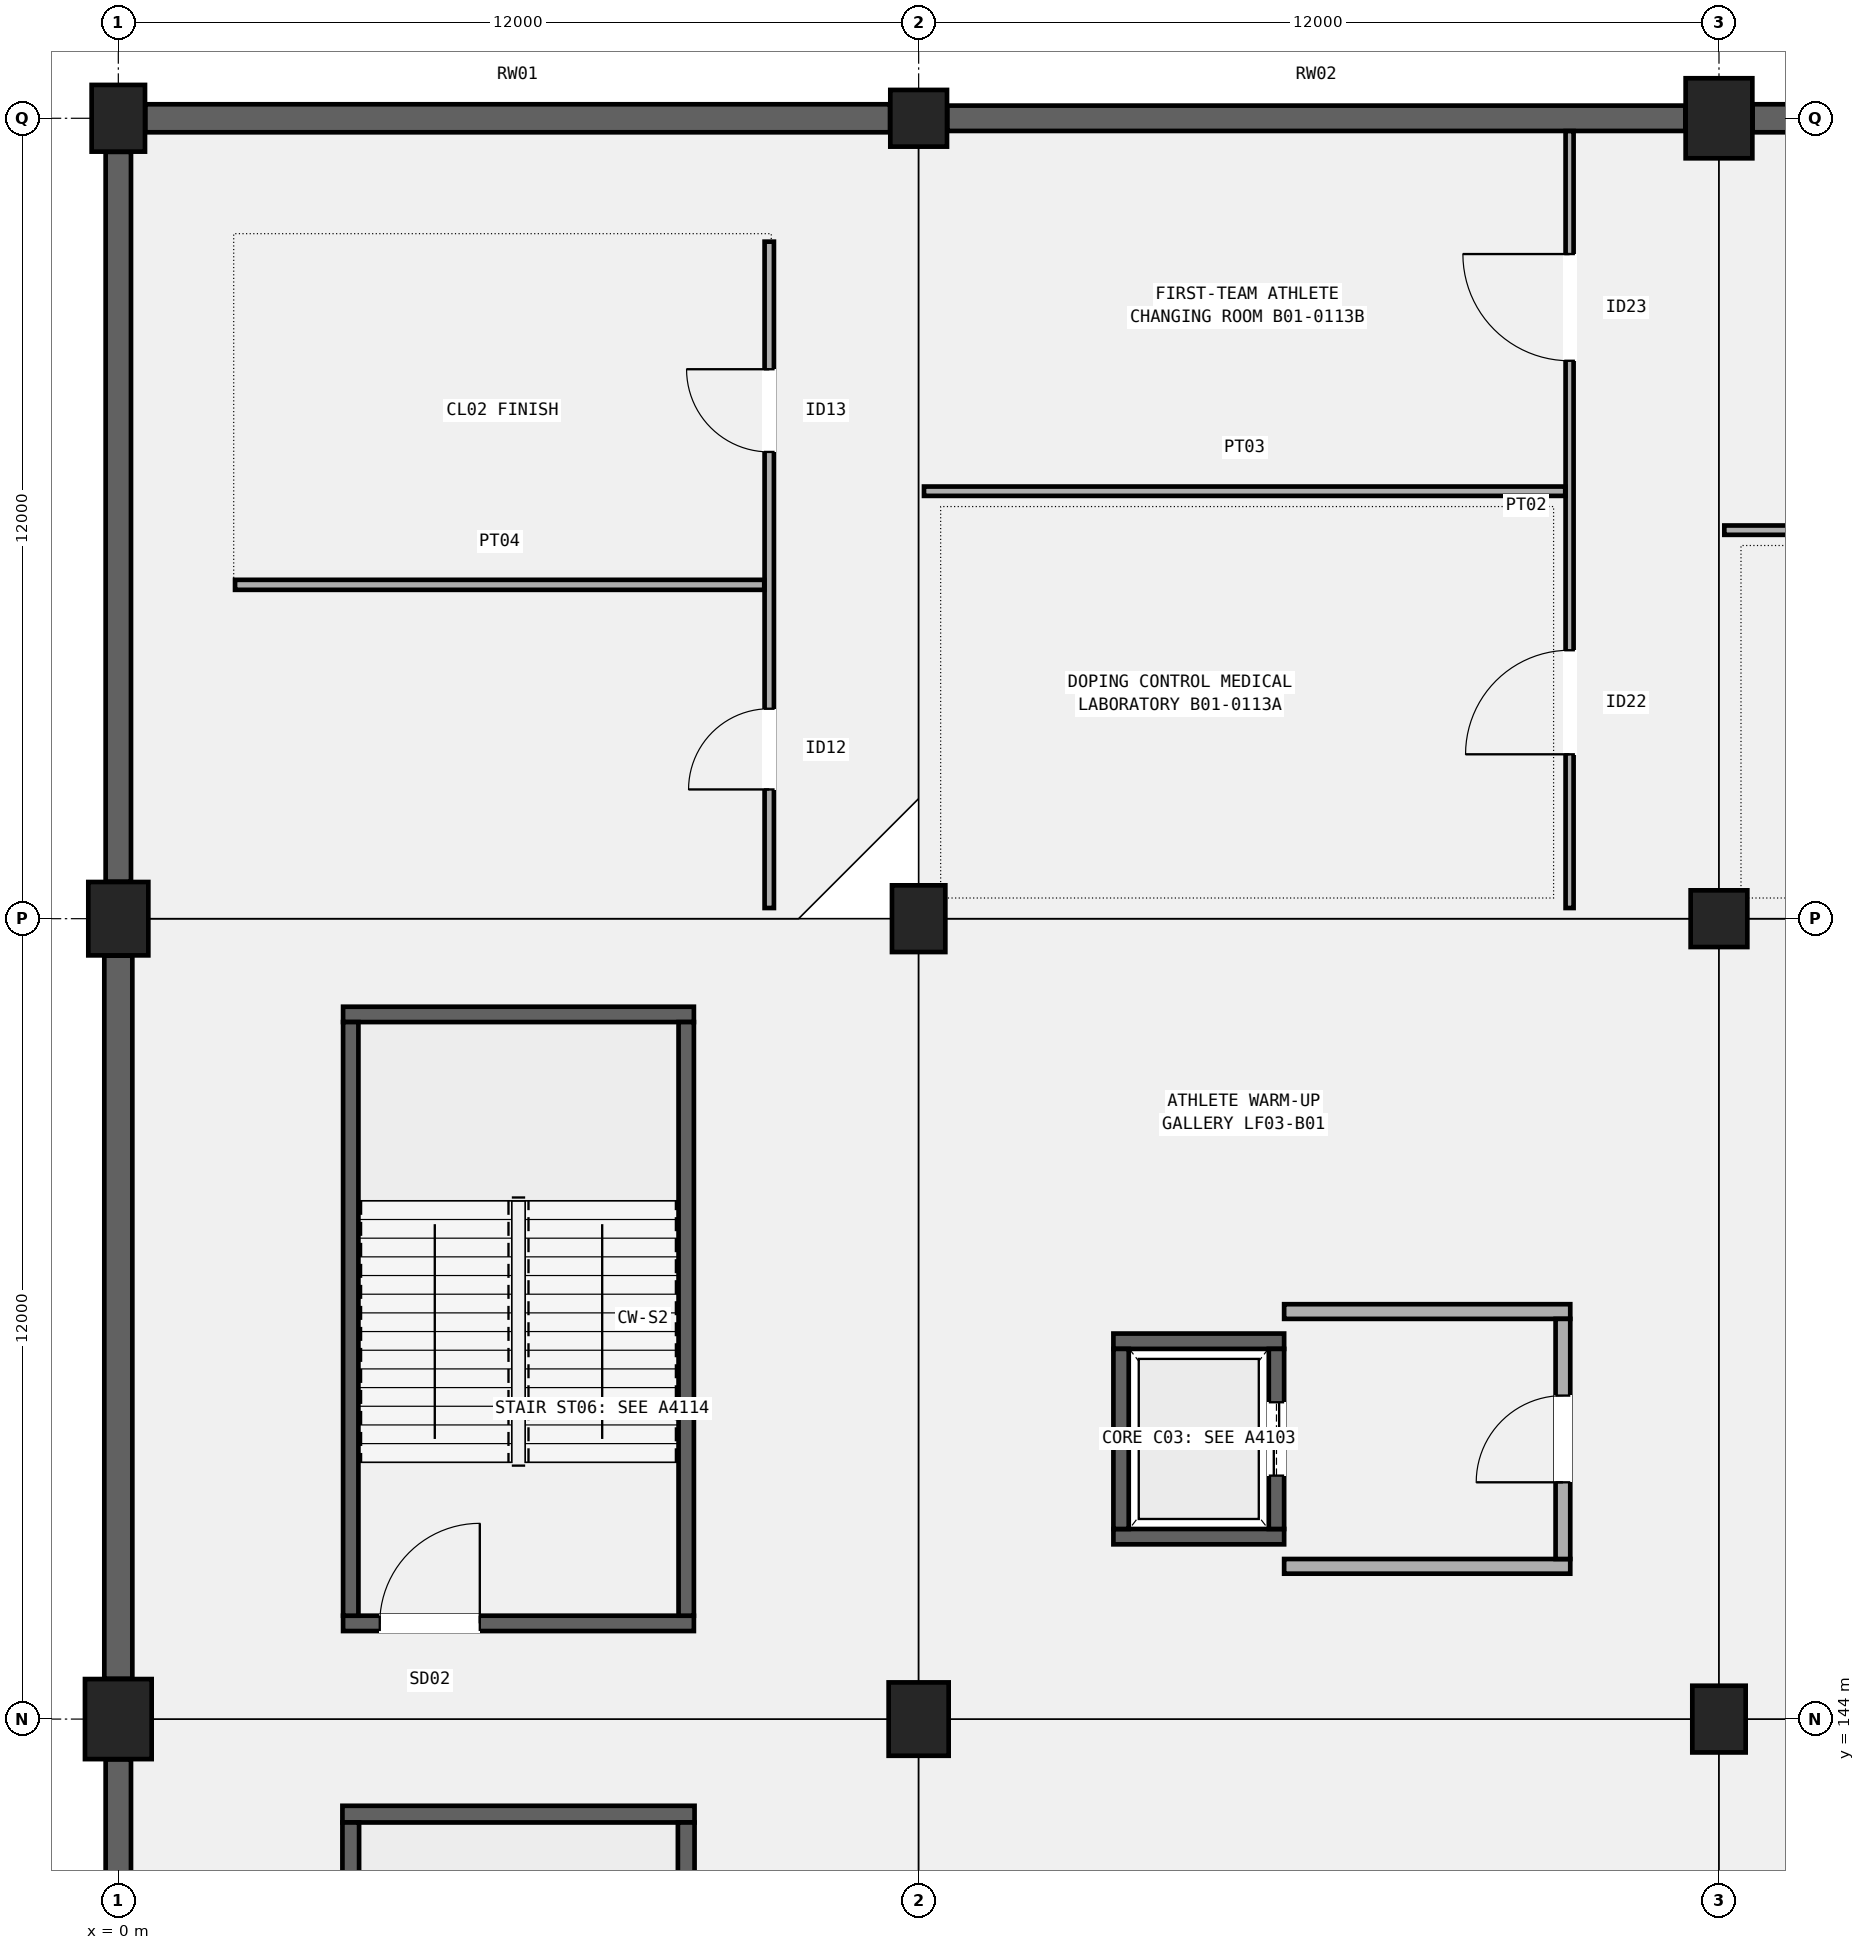
"""IFC4 building model, lengths in metres.
Left out: names, types, materials, properties, quantities, classifications, styles, units other than length and angle.
Written with IfcOpenShell. Run it as: python <this file> out.ifc"""

import sys

from ifc_helpers import new_model, si_unit, direction, frame, frame_2d, origin, origin_2d, place, context, subcontext, project, spatial, rectangle, circle, extrude, element, fill, save


model = new_model("IFC4")
c1 = context("Model", 3, precision=1e-05, world=origin(), true_north=direction((0.0, 1.0)))
c2 = subcontext(c1, "Body", "Model", "MODEL_VIEW")
j1 = project(units=[si_unit("LENGTHUNIT", "METRE"), si_unit("PLANEANGLEUNIT", "RADIAN")], contexts=[c1])
p1 = place(None, origin())
s1 = spatial("IfcSite", under=j1, at=p1, CompositionType="ELEMENT")
p2 = place(p1, origin())
s2 = spatial("IfcBuilding", under=s1, at=p2, CompositionType="ELEMENT")
p3 = place(p2, frame((0.0, 0.0, -4.8)))
s3 = spatial("IfcBuildingStorey", under=s2, at=p3, CompositionType="ELEMENT", Elevation=-4.8)
p4 = place(p3, frame((0.0, 144.0, 0.0), z_axis=(0.0, 0.0, 1.0), x_axis=(1.0, 0.0, 0.0)))
e1 = element("IfcColumn", 1, at=p4, inside=s3, PredefinedType="COLUMN", context=c2, shape_type="SweptSolid", body=[
    extrude(rectangle(XDim=1.0, YDim=1.2, at=origin_2d()), origin(), (0.0, 0.0, 1.0), 4.8),
])
p5 = place(p3, frame((0.0, 156.0, 0.0), z_axis=(0.0, 0.0, 1.0), x_axis=(1.0, 0.0, 0.0)))
e2 = element("IfcColumn", 2, at=p5, inside=s3, PredefinedType="COLUMN", context=c2, shape_type="SweptSolid", body=[
    extrude(rectangle(XDim=0.9, YDim=1.1, at=origin_2d()), origin(), (0.0, 0.0, 1.0), 4.8),
])
p6 = place(p3, frame((0.0, 168.0, 0.0), z_axis=(0.0, 0.0, 1.0), x_axis=(1.0, 0.0, 0.0)))
e3 = element("IfcColumn", 3, at=p6, inside=s3, PredefinedType="COLUMN", context=c2, shape_type="SweptSolid", body=[
    extrude(rectangle(XDim=0.8, YDim=1.0, at=origin_2d()), origin(), (0.0, 0.0, 1.0), 4.8),
])
p7 = place(p3, frame((12.0, 144.0, 0.0), z_axis=(0.0, 0.0, 1.0), x_axis=(1.0, 0.0, 0.0)))
e4 = element("IfcColumn", 4, at=p7, inside=s3, PredefinedType="COLUMN", context=c2, shape_type="SweptSolid", body=[
    extrude(rectangle(XDim=0.9, YDim=1.1, at=origin_2d()), origin(), (0.0, 0.0, 1.0), 4.8),
])
p8 = place(p3, frame((12.0, 156.0, 0.0), z_axis=(0.0, 0.0, 1.0), x_axis=(1.0, 0.0, 0.0)))
e5 = element("IfcColumn", 5, at=p8, inside=s3, PredefinedType="COLUMN", context=c2, shape_type="SweptSolid", body=[
    extrude(rectangle(XDim=0.8, YDim=1.0, at=origin_2d()), origin(), (0.0, 0.0, 1.0), 4.8),
])
p9 = place(p3, frame((12.0, 168.0, 0.0), z_axis=(0.0, 0.0, 1.0), x_axis=(1.0, 0.0, 0.0)))
e6 = element("IfcColumn", 6, at=p9, inside=s3, PredefinedType="COLUMN", context=c2, shape_type="SweptSolid", body=[
    extrude(circle(Radius=0.425, at=origin_2d()), origin(), (0.0, 0.0, 1.0), 4.8),
])
p10 = place(p3, frame((24.0, 144.0, 0.0), z_axis=(0.0, 0.0, 1.0), x_axis=(1.0, 0.0, 0.0)))
e7 = element("IfcColumn", 7, at=p10, inside=s3, PredefinedType="COLUMN", context=c2, shape_type="SweptSolid", body=[
    extrude(rectangle(XDim=0.8, YDim=1.0, at=origin_2d()), origin(), (0.0, 0.0, 1.0), 4.8),
])
p11 = place(p3, frame((24.0, 156.0, 0.0), z_axis=(0.0, 0.0, 1.0), x_axis=(1.0, 0.0, 0.0)))
e8 = element("IfcColumn", 8, at=p11, inside=s3, PredefinedType="COLUMN", context=c2, shape_type="SweptSolid", body=[
    extrude(circle(Radius=0.425, at=origin_2d()), origin(), (0.0, 0.0, 1.0), 4.8),
])
p12 = place(p3, frame((24.0, 168.0, 0.0), z_axis=(0.0, 0.0, 1.0), x_axis=(1.0, 0.0, 0.0)))
e9 = element("IfcColumn", 9, at=p12, inside=s3, PredefinedType="COLUMN", context=c2, shape_type="SweptSolid", body=[
    extrude(rectangle(XDim=1.0, YDim=1.2, at=origin_2d()), origin(), (0.0, 0.0, 1.0), 4.8),
])
p13 = place(p3, frame((0.0, 132.429, 0.0), z_axis=(0.0, 0.0, 1.0), x_axis=(0.0, 1.0, 0.0)))
e10 = element("IfcWall", 10, at=p13, inside=s3, PredefinedType="STANDARD", context=c2, shape_type="SweptSolid", body=[
    extrude(rectangle(XDim=10.967, YDim=0.38, at=frame_2d((5.483, 0.0))), origin(), (0.0, 0.0, 1.0), 4.46),
])
p14 = place(p3, frame((0.0, 144.604, 0.0), z_axis=(0.0, 0.0, 1.0), x_axis=(0.0, 1.0, 0.0)))
e11 = element("IfcWall", 11, at=p14, inside=s3, PredefinedType="STANDARD", context=c2, shape_type="SweptSolid", body=[
    extrude(rectangle(XDim=10.842, YDim=0.42, at=frame_2d((5.421, 0.0))), origin(), (0.0, 0.0, 1.0), 4.46),
])
p15 = place(p3, frame((0.404, 168.0, 0.0), z_axis=(0.0, 0.0, 1.0), x_axis=(1.0, 0.0, 0.0)))
e12 = element("IfcWall", 12, at=p15, inside=s3, PredefinedType="STANDARD", context=c2, shape_type="SweptSolid", body=[
    extrude(rectangle(XDim=11.167, YDim=0.42, at=frame_2d((5.583, 0.0))), origin(), (0.0, 0.0, 1.0), 4.46),
])
p16 = place(p3, frame((0.0, 156.554, 0.0), z_axis=(0.0, 0.0, 1.0), x_axis=(0.0, 1.0, 0.0)))
e13 = element("IfcWall", 13, at=p16, inside=s3, PredefinedType="STANDARD", context=c2, shape_type="SweptSolid", body=[
    extrude(rectangle(XDim=10.942, YDim=0.38, at=frame_2d((5.471, 0.0))), origin(), (0.0, 0.0, 1.0), 4.46),
])
p17 = place(p3, frame((12.429, 168.0, 0.0), z_axis=(0.0, 0.0, 1.0), x_axis=(1.0, 0.0, 0.0)))
e14 = element("IfcWall", 14, at=p17, inside=s3, PredefinedType="STANDARD", context=c2, shape_type="SweptSolid", body=[
    extrude(rectangle(XDim=11.067, YDim=0.38, at=frame_2d((5.534, 0.0))), origin(), (0.0, 0.0, 1.0), 4.46),
])
p18 = place(p3, frame((24.504, 168.0, 0.0), z_axis=(0.0, 0.0, 1.0), x_axis=(1.0, 0.0, 0.0)))
e15 = element("IfcWall", 15, at=p18, inside=s3, PredefinedType="STANDARD", context=c2, shape_type="SweptSolid", body=[
    extrude(rectangle(XDim=11.542, YDim=0.42, at=frame_2d((5.771, 0.0))), origin(), (0.0, 0.0, 1.0), 4.46),
])
p19 = place(p3, frame((3.36, 142.575, 0.0), z_axis=(0.0, 0.0, 1.0), x_axis=(1.0, 0.0, 0.0)))
e16 = element("IfcWall", 16, at=p19, inside=s3, PredefinedType="SHEAR", context=c2, shape_type="SweptSolid", body=[
    extrude(rectangle(XDim=5.28, YDim=0.25, at=frame_2d((2.64, 0.0))), origin(), (0.0, 0.0, 1.0), 4.5),
])
for number, where, z_axis, x_axis in (
    (17, (3.485, 133.55, 0.0), (0.0, 0.0, 1.0), (0.0, 1.0, 0.0)),
    (18, (8.515, 133.55, 0.0), (0.0, 0.0, 1.0), (0.0, 1.0, 0.0)),
):
    element("IfcWall", number, at=place(p3, frame(where, z_axis=z_axis, x_axis=x_axis)), inside=s3, PredefinedType="SHEAR", context=c2, shape_type="SweptSolid", body=[
        extrude(rectangle(XDim=8.9, YDim=0.25, at=frame_2d((4.45, 0.0))), origin(), (0.0, 0.0, 1.0), 4.5),
    ])
p20 = place(p3, frame((3.37, 145.435, 0.0), z_axis=(0.0, 0.0, 1.0), x_axis=(1.0, 0.0, 0.0)))
e19 = element("IfcWall", 19, at=p20, inside=s3, PredefinedType="SHEAR", context=c2, shape_type="SweptSolid", body=[
    extrude(rectangle(XDim=5.26, YDim=0.23, at=frame_2d((2.63, 0.0))), origin(), (0.0, 0.0, 1.0), 4.5),
])
p21 = place(p20, frame((0.55, 0.0, 0.0)))
e20 = element("IfcOpeningElement", 20, at=p21, cuts=e19, PredefinedType="OPENING", context=c2, shape_type="SweptSolid", body=[
    extrude(rectangle(XDim=1.5, YDim=2.2, at=frame_2d((0.75, 1.1))), frame((0.0, 0.125, 0.0), z_axis=(0.0, -1.0, 0.0), x_axis=(1.0, 0.0, 0.0)), (0.0, 0.0, 1.0), 0.25),
])
p22 = place(p3, frame((3.37, 154.565, 0.0), z_axis=(0.0, 0.0, 1.0), x_axis=(1.0, 0.0, 0.0)))
e21 = element("IfcWall", 21, at=p22, inside=s3, PredefinedType="SHEAR", context=c2, shape_type="SweptSolid", body=[
    extrude(rectangle(XDim=5.26, YDim=0.23, at=frame_2d((2.63, 0.0))), origin(), (0.0, 0.0, 1.0), 4.5),
])
for number, where, z_axis, x_axis in (
    (22, (3.485, 145.55, 0.0), (0.0, 0.0, 1.0), (0.0, 1.0, 0.0)),
    (23, (8.515, 145.55, 0.0), (0.0, 0.0, 1.0), (0.0, 1.0, 0.0)),
):
    element("IfcWall", number, at=place(p3, frame(where, z_axis=z_axis, x_axis=x_axis)), inside=s3, PredefinedType="SHEAR", context=c2, shape_type="SweptSolid", body=[
        extrude(rectangle(XDim=8.9, YDim=0.23, at=frame_2d((4.45, 0.0))), origin(), (0.0, 0.0, 1.0), 4.5),
    ])
for number, where, z_axis, x_axis in (
    (24, (14.92, 146.735, -0.65), (0.0, 0.0, 1.0), (1.0, 0.0, 0.0)),
    (25, (14.92, 149.665, -0.65), (0.0, 0.0, 1.0), (1.0, 0.0, 0.0)),
):
    element("IfcWall", number, at=place(p3, frame(where, z_axis=z_axis, x_axis=x_axis)), inside=s3, PredefinedType="SHEAR", context=c2, shape_type="SweptSolid", body=[
        extrude(rectangle(XDim=2.56, YDim=0.23, at=frame_2d((1.28, 0.0))), origin(), (0.0, 0.0, 1.0), 4.5),
    ])
p23 = place(p3, frame((15.035, 146.85, -0.65), z_axis=(0.0, 0.0, 1.0), x_axis=(0.0, 1.0, 0.0)))
e26 = element("IfcWall", 26, at=p23, inside=s3, PredefinedType="SHEAR", context=c2, shape_type="SweptSolid", body=[
    extrude(rectangle(XDim=2.7, YDim=0.23, at=frame_2d((1.35, 0.0))), origin(), (0.0, 0.0, 1.0), 4.5),
])
p24 = place(p3, frame((17.365, 146.85, -0.65), z_axis=(0.0, 0.0, 1.0), x_axis=(0.0, 1.0, 0.0)))
e27 = element("IfcWall", 27, at=p24, inside=s3, PredefinedType="SHEAR", context=c2, shape_type="SweptSolid", body=[
    extrude(rectangle(XDim=2.7, YDim=0.23, at=frame_2d((1.35, 0.0))), origin(), (0.0, 0.0, 1.0), 4.5),
])
p25 = place(p24, frame((0.8, 0.0, 0.65)))
e28 = element("IfcOpeningElement", 28, at=p25, cuts=e27, PredefinedType="OPENING", context=c2, shape_type="SweptSolid", body=[
    extrude(rectangle(XDim=1.1, YDim=2.15, at=frame_2d((0.55, 1.075))), frame((0.0, 0.125, 0.0), z_axis=(0.0, -1.0, 0.0), x_axis=(1.0, 0.0, 0.0)), (0.0, 0.0, 1.0), 0.25),
])
for number, where, z_axis, x_axis in (
    (29, (17.48, 146.29, -0.65), (0.0, 0.0, 1.0), (1.0, 0.0, 0.0)),
    (30, (17.48, 150.11, -0.65), (0.0, 0.0, 1.0), (1.0, 0.0, 0.0)),
):
    element("IfcWall", number, at=place(p3, frame(where, z_axis=z_axis, x_axis=x_axis)), inside=s3, PredefinedType="SOLIDWALL", context=c2, shape_type="SweptSolid", body=[
        extrude(rectangle(XDim=4.29, YDim=0.22, at=frame_2d((2.145, 0.0))), origin(), (0.0, 0.0, 1.0), 4.57),
    ])
p26 = place(p3, frame((21.66, 146.4, -0.65), z_axis=(0.0, 0.0, 1.0), x_axis=(0.0, 1.0, 0.0)))
e31 = element("IfcWall", 31, at=p26, inside=s3, PredefinedType="SOLIDWALL", context=c2, shape_type="SweptSolid", body=[
    extrude(rectangle(XDim=3.6, YDim=0.22, at=frame_2d((1.8, 0.0))), origin(), (0.0, 0.0, 1.0), 4.57),
])
p27 = place(p26, frame((1.15, 0.0, 0.65)))
e32 = element("IfcOpeningElement", 32, at=p27, cuts=e31, PredefinedType="OPENING", context=c2, shape_type="SweptSolid", body=[
    extrude(rectangle(XDim=1.3, YDim=2.15, at=frame_2d((0.65, 1.075))), frame((0.0, 0.12, 0.0), z_axis=(0.0, -1.0, 0.0), x_axis=(1.0, 0.0, 0.0)), (0.0, 0.0, 1.0), 0.24),
])
p28 = place(p3, frame((9.76, 156.16, 0.0), z_axis=(0.0, 0.0, 1.0), x_axis=(0.0, 1.0, 0.0)))
e33 = element("IfcWall", 33, at=p28, inside=s3, PredefinedType="PARTITIONING", context=c2, shape_type="SweptSolid", body=[
    extrude(rectangle(XDim=9.99, YDim=0.14, at=frame_2d((4.995, 0.0))), origin(), (0.0, 0.0, 1.0), 3.92),
])
p29 = place(p28, frame((1.778, 0.0, 0.0)))
e34 = element("IfcOpeningElement", 34, at=p29, cuts=e33, PredefinedType="OPENING", context=c2, shape_type="SweptSolid", body=[
    extrude(rectangle(XDim=1.21, YDim=2.18, at=frame_2d((0.605, 1.09))), frame((0.0, 0.08, 0.0), z_axis=(0.0, -1.0, 0.0), x_axis=(1.0, 0.0, 0.0)), (0.0, 0.0, 1.0), 0.16),
])
p30 = place(p28, frame((6.838, 0.0, 0.0)))
e35 = element("IfcOpeningElement", 35, at=p30, cuts=e33, PredefinedType="OPENING", context=c2, shape_type="SweptSolid", body=[
    extrude(rectangle(XDim=1.24, YDim=2.22, at=frame_2d((0.62, 1.11))), frame((0.0, 0.08, 0.0), z_axis=(0.0, -1.0, 0.0), x_axis=(1.0, 0.0, 0.0)), (0.0, 0.0, 1.0), 0.16),
])
p31 = place(p3, frame((1.75, 161.005, 0.0), z_axis=(0.0, 0.0, 1.0), x_axis=(1.0, 0.0, 0.0)))
e36 = element("IfcWall", 36, at=p31, inside=s3, PredefinedType="PARTITIONING", context=c2, shape_type="SweptSolid", body=[
    extrude(rectangle(XDim=7.935, YDim=0.15, at=frame_2d((3.968, 0.0))), origin(), (0.0, 0.0, 1.0), 3.92),
])
p32 = place(p3, frame((21.76, 156.16, 0.0), z_axis=(0.0, 0.0, 1.0), x_axis=(0.0, 1.0, 0.0)))
e37 = element("IfcWall", 37, at=p32, inside=s3, PredefinedType="PARTITIONING", context=c2, shape_type="SweptSolid", body=[
    extrude(rectangle(XDim=11.648, YDim=0.12, at=frame_2d((5.824, 0.0))), origin(), (0.0, 0.0, 1.0), 3.92),
])
p33 = place(p32, frame((2.304, 0.0, 0.0)))
e38 = element("IfcOpeningElement", 38, at=p33, cuts=e37, PredefinedType="OPENING", context=c2, shape_type="SweptSolid", body=[
    extrude(rectangle(XDim=1.56, YDim=2.26, at=frame_2d((0.78, 1.13))), frame((0.0, 0.07, 0.0), z_axis=(0.0, -1.0, 0.0), x_axis=(1.0, 0.0, 0.0)), (0.0, 0.0, 1.0), 0.14),
])
p34 = place(p32, frame((8.204, 0.0, 0.0)))
e39 = element("IfcOpeningElement", 39, at=p34, cuts=e37, PredefinedType="OPENING", context=c2, shape_type="SweptSolid", body=[
    extrude(rectangle(XDim=1.6, YDim=2.3, at=frame_2d((0.8, 1.15))), frame((0.0, 0.07, 0.0), z_axis=(0.0, -1.0, 0.0), x_axis=(1.0, 0.0, 0.0)), (0.0, 0.0, 1.0), 0.14),
])
p35 = place(p3, frame((12.08, 162.409, 0.0), z_axis=(0.0, 0.0, 1.0), x_axis=(1.0, 0.0, 0.0)))
e40 = element("IfcWall", 40, at=p35, inside=s3, PredefinedType="PARTITIONING", context=c2, shape_type="SweptSolid", body=[
    extrude(rectangle(XDim=9.615, YDim=0.14, at=frame_2d((4.808, 0.0))), origin(), (0.0, 0.0, 1.0), 3.92),
])
p36 = place(p3, frame((24.08, 161.825, 0.0), z_axis=(0.0, 0.0, 1.0), x_axis=(1.0, 0.0, 0.0)))
e41 = element("IfcWall", 41, at=p36, inside=s3, PredefinedType="PARTITIONING", context=c2, shape_type="SweptSolid", body=[
    extrude(rectangle(XDim=10.115, YDim=0.14, at=frame_2d((5.058, 0.0))), origin(), (0.0, 0.0, 1.0), 3.92),
])
p37 = place(p21, origin())
e42 = element("IfcDoor", 42, at=p37, inside=s3, OperationType="SINGLE_SWING_RIGHT", PredefinedType="DOOR", context=c2, shape_type="SweptSolid", body=[
    extrude(rectangle(XDim=1.5, YDim=2.2, at=frame_2d((0.75, 1.1))), frame((0.0, 0.025, 0.0), z_axis=(0.0, -1.0, 0.0), x_axis=(1.0, 0.0, 0.0)), (0.0, 0.0, 1.0), 0.05),
])
fill(e20, e42)
p38 = place(p25, origin())
e43 = element("IfcDoor", 43, at=p38, inside=s3, OperationType="DOUBLE_DOOR_SLIDING", PredefinedType="DOOR", context=c2, shape_type="SweptSolid", body=[
    extrude(rectangle(XDim=1.1, YDim=2.15, at=frame_2d((0.55, 1.075))), frame((0.0, 0.025, 0.0), z_axis=(0.0, -1.0, 0.0), x_axis=(1.0, 0.0, 0.0)), (0.0, 0.0, 1.0), 0.05),
])
fill(e28, e43)
p39 = place(p27, origin())
e44 = element("IfcDoor", 44, at=p39, inside=s3, OperationType="SINGLE_SWING_LEFT", PredefinedType="DOOR", context=c2, shape_type="SweptSolid", body=[
    extrude(rectangle(XDim=1.3, YDim=2.15, at=frame_2d((0.65, 1.075))), frame((0.0, 0.025, 0.0), z_axis=(0.0, -1.0, 0.0), x_axis=(1.0, 0.0, 0.0)), (0.0, 0.0, 1.0), 0.05),
])
fill(e32, e44)
p40 = place(p29, origin())
e45 = element("IfcDoor", 45, at=p40, inside=s3, OperationType="SINGLE_SWING_LEFT", PredefinedType="DOOR", context=c2, shape_type="SweptSolid", body=[
    extrude(rectangle(XDim=1.21, YDim=2.18, at=frame_2d((0.605, 1.09))), frame((0.0, 0.025, 0.0), z_axis=(0.0, -1.0, 0.0), x_axis=(1.0, 0.0, 0.0)), (0.0, 0.0, 1.0), 0.05),
])
fill(e34, e45)
p41 = place(p30, origin())
e46 = element("IfcDoor", 46, at=p41, inside=s3, OperationType="SINGLE_SWING_RIGHT", PredefinedType="DOOR", context=c2, shape_type="SweptSolid", body=[
    extrude(rectangle(XDim=1.24, YDim=2.22, at=frame_2d((0.62, 1.11))), frame((0.0, 0.025, 0.0), z_axis=(0.0, -1.0, 0.0), x_axis=(1.0, 0.0, 0.0)), (0.0, 0.0, 1.0), 0.05),
])
fill(e35, e46)
p42 = place(p33, origin())
e47 = element("IfcDoor", 47, at=p42, inside=s3, OperationType="SINGLE_SWING_LEFT", PredefinedType="DOOR", context=c2, shape_type="SweptSolid", body=[
    extrude(rectangle(XDim=1.56, YDim=2.26, at=frame_2d((0.78, 1.13))), frame((0.0, 0.025, 0.0), z_axis=(0.0, -1.0, 0.0), x_axis=(1.0, 0.0, 0.0)), (0.0, 0.0, 1.0), 0.05),
])
fill(e38, e47)
p43 = place(p34, origin())
e48 = element("IfcDoor", 48, at=p43, inside=s3, OperationType="SINGLE_SWING_RIGHT", PredefinedType="DOOR", context=c2, shape_type="SweptSolid", body=[
    extrude(rectangle(XDim=1.6, YDim=2.3, at=frame_2d((0.8, 1.15))), frame((0.0, 0.025, 0.0), z_axis=(0.0, -1.0, 0.0), x_axis=(1.0, 0.0, 0.0)), (0.0, 0.0, 1.0), 0.05),
])
fill(e39, e48)
save(model, sys.argv[1])
